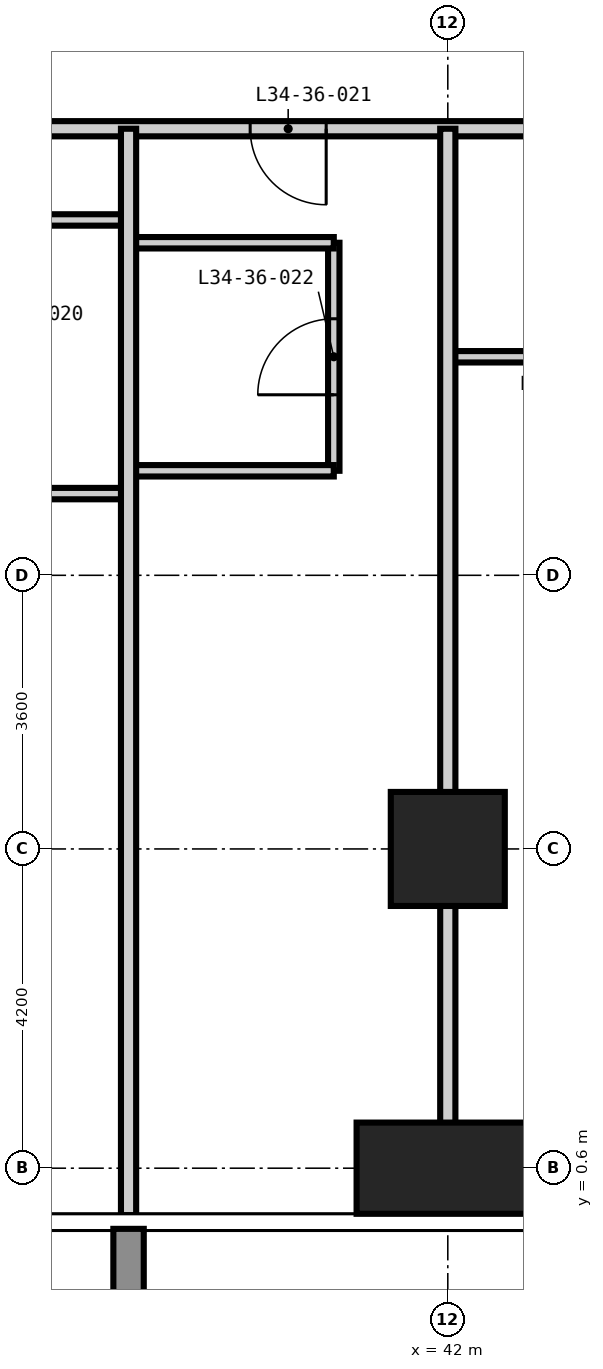
"""IFC4 building model, lengths in metres.
Left out: names, types, materials, properties, quantities, classifications, styles, units other than length and angle.
Written with IfcOpenShell. Run it as: python <this file> out.ifc"""

import sys

from ifc_helpers import new_model, si_unit, direction, frame, frame_2d, origin, origin_2d, place, context, subcontext, project, spatial, rectangle, extrude, element, fill, save


model = new_model("IFC4")
c1 = context("Model", 3, precision=1e-05, world=origin(), true_north=direction((0.0, 1.0)))
c2 = subcontext(c1, "Body", "Model", "MODEL_VIEW")
j1 = project(units=[si_unit("LENGTHUNIT", "METRE"), si_unit("PLANEANGLEUNIT", "RADIAN")], contexts=[c1])
p1 = place(None, origin())
s1 = spatial("IfcSite", under=j1, at=p1, CompositionType="ELEMENT")
p2 = place(p1, origin())
s2 = spatial("IfcBuilding", under=s1, at=p2, CompositionType="ELEMENT")
p3 = place(p2, frame((0.0, 0.0, 133.2)))
s3 = spatial("IfcBuildingStorey", under=s2, at=p3, CompositionType="ELEMENT", Elevation=133.2)
p4 = place(p3, frame((42.0, 0.6, -0.35), z_axis=(0.0, 0.0, 1.0), x_axis=(1.0, 0.0, 0.0)))
e1 = element("IfcColumn", 1, at=p4, inside=s3, PredefinedType="COLUMN", context=c2, shape_type="SweptSolid", body=[
    extrude(rectangle(XDim=2.4, YDim=1.2, at=origin_2d()), origin(), (0.0, 0.0, 1.0), 3.6),
])
p5 = place(p3, frame((42.0, 4.8, -0.35), z_axis=(0.0, 0.0, 1.0), x_axis=(1.0, 0.0, 0.0)))
e2 = element("IfcColumn", 2, at=p5, inside=s3, PredefinedType="COLUMN", context=c2, shape_type="SweptSolid", body=[
    extrude(rectangle(XDim=1.5, YDim=1.5, at=origin_2d()), origin(), (0.0, 0.0, 1.0), 3.6),
])
p6 = place(p3, frame((40.5, 9.775, 0.0), z_axis=(0.0, 0.0, 1.0), x_axis=(0.0, 1.0, 0.0)))
e3 = element("IfcWall", 3, at=p6, inside=s3, PredefinedType="PARTITIONING", context=c2, shape_type="SweptSolid", body=[
    extrude(rectangle(XDim=3.0, YDim=0.15, at=frame_2d((1.5, 0.0))), origin(), (0.0, 0.0, 1.0), 3.25),
])
p7 = place(p6, frame((1.0, 0.0, 0.0)))
e4 = element("IfcOpeningElement", 4, at=p7, cuts=e3, PredefinedType="OPENING", context=c2, shape_type="SweptSolid", body=[
    extrude(rectangle(XDim=1.0, YDim=2.1, at=frame_2d((0.5, 1.05))), frame((0.0, 0.085, 0.0), z_axis=(0.0, -1.0, 0.0), x_axis=(1.0, 0.0, 0.0)), (0.0, 0.0, 1.0), 0.17),
])
for number, where, z_axis, x_axis in (
    (5, (35.1, 9.475, 0.0), (0.0, 0.0, 1.0), (1.0, 0.0, 0.0)),
    (6, (37.8, 9.775, 0.0), (0.0, 0.0, 1.0), (1.0, 0.0, 0.0)),
):
    element("IfcWall", number, at=place(p3, frame(where, z_axis=z_axis, x_axis=x_axis)), inside=s3, PredefinedType="PARTITIONING", context=c2, shape_type="SweptSolid", body=[
        extrude(rectangle(XDim=2.7, YDim=0.15, at=frame_2d((1.35, 0.0))), origin(), (0.0, 0.0, 1.0), 3.25),
    ])
p8 = place(p3, frame((42.0, 11.275, 0.0), z_axis=(0.0, 0.0, 1.0), x_axis=(1.0, 0.0, 0.0)))
e7 = element("IfcWall", 7, at=p8, inside=s3, PredefinedType="PARTITIONING", context=c2, shape_type="SweptSolid", body=[
    extrude(rectangle(XDim=3.725, YDim=0.15, at=frame_2d((1.863, 0.0))), origin(), (0.0, 0.0, 1.0), 3.25),
])
p9 = place(p8, frame((1.438, 0.0, 0.0)))
e8 = element("IfcOpeningElement", 8, at=p9, cuts=e7, PredefinedType="OPENING", context=c2, shape_type="SweptSolid", body=[
    extrude(rectangle(XDim=0.85, YDim=2.1, at=frame_2d((0.425, 1.05))), frame((0.0, 0.085, 0.0), z_axis=(0.0, -1.0, 0.0), x_axis=(1.0, 0.0, 0.0)), (0.0, 0.0, 1.0), 0.17),
])
for number, where, z_axis, x_axis in (
    (9, (37.8, 12.775, 0.0), (0.0, 0.0, 1.0), (1.0, 0.0, 0.0)),
    (10, (35.1, 13.075, 0.0), (0.0, 0.0, 1.0), (1.0, 0.0, 0.0)),
):
    element("IfcWall", number, at=place(p3, frame(where, z_axis=z_axis, x_axis=x_axis)), inside=s3, PredefinedType="PARTITIONING", context=c2, shape_type="SweptSolid", body=[
        extrude(rectangle(XDim=2.7, YDim=0.15, at=frame_2d((1.35, 0.0))), origin(), (0.0, 0.0, 1.0), 3.25),
    ])
p10 = place(p3, frame((45.725, 14.275, 0.0), z_axis=(0.0, 0.0, 1.0), x_axis=(-1.0, 0.0, 0.0)))
e11 = element("IfcWall", 11, at=p10, inside=s3, PredefinedType="PARTITIONING", context=c2, shape_type="SweptSolid", body=[
    extrude(rectangle(XDim=33.125, YDim=0.2, at=frame_2d((16.562, 0.0))), origin(), (0.0, 0.0, 1.0), 3.25),
])
p11 = place(p10, frame((26.325, 0.0, 0.0)))
e12 = element("IfcOpeningElement", 12, at=p11, cuts=e11, PredefinedType="OPENING", context=c2, shape_type="SweptSolid", body=[
    extrude(rectangle(XDim=1.0, YDim=2.2, at=frame_2d((0.5, 1.1))), frame((0.0, 0.11, 0.0), z_axis=(0.0, -1.0, 0.0), x_axis=(1.0, 0.0, 0.0)), (0.0, 0.0, 1.0), 0.22),
])
p12 = place(p10, frame((21.225, 0.0, 0.0)))
e13 = element("IfcOpeningElement", 13, at=p12, cuts=e11, PredefinedType="OPENING", context=c2, shape_type="SweptSolid", body=[
    extrude(rectangle(XDim=1.0, YDim=2.2, at=frame_2d((0.5, 1.1))), frame((0.0, 0.11, 0.0), z_axis=(0.0, -1.0, 0.0), x_axis=(1.0, 0.0, 0.0)), (0.0, 0.0, 1.0), 0.22),
])
p13 = place(p10, frame((12.825, 0.0, 0.0)))
e14 = element("IfcOpeningElement", 14, at=p13, cuts=e11, PredefinedType="OPENING", context=c2, shape_type="SweptSolid", body=[
    extrude(rectangle(XDim=1.0, YDim=2.2, at=frame_2d((0.5, 1.1))), frame((0.0, 0.11, 0.0), z_axis=(0.0, -1.0, 0.0), x_axis=(1.0, 0.0, 0.0)), (0.0, 0.0, 1.0), 0.22),
])
p14 = place(p10, frame((5.325, 0.0, 0.0)))
e15 = element("IfcOpeningElement", 15, at=p14, cuts=e11, PredefinedType="OPENING", context=c2, shape_type="SweptSolid", body=[
    extrude(rectangle(XDim=1.0, YDim=2.2, at=frame_2d((0.5, 1.1))), frame((0.0, 0.11, 0.0), z_axis=(0.0, -1.0, 0.0), x_axis=(1.0, 0.0, 0.0)), (0.0, 0.0, 1.0), 0.22),
])
for number, where, z_axis, x_axis in (
    (16, (37.8, -0.018, 0.0), (0.0, 0.0, 1.0), (0.0, 1.0, 0.0)),
    (17, (42.0, -0.018, 0.0), (0.0, 0.0, 1.0), (0.0, 1.0, 0.0)),
):
    element("IfcWall", number, at=place(p3, frame(where, z_axis=z_axis, x_axis=x_axis)), inside=s3, PredefinedType="PARTITIONING", context=c2, shape_type="SweptSolid", body=[
        extrude(rectangle(XDim=14.293, YDim=0.2, at=frame_2d((7.146, 0.0))), origin(), (0.0, 0.0, 1.0), 3.25),
    ])
p15 = place(p14, origin())
e18 = element("IfcDoor", 18, at=p15, inside=s3, OperationType="SINGLE_SWING_LEFT", PredefinedType="DOOR", context=c2, shape_type="SweptSolid", body=[
    extrude(rectangle(XDim=1.0, YDim=2.2, at=frame_2d((0.5, 1.1))), frame((0.0, 0.025, 0.0), z_axis=(0.0, -1.0, 0.0), x_axis=(1.0, 0.0, 0.0)), (0.0, 0.0, 1.0), 0.05),
])
fill(e15, e18)
p16 = place(p7, origin())
e19 = element("IfcDoor", 19, at=p16, inside=s3, OperationType="SINGLE_SWING_LEFT", PredefinedType="DOOR", context=c2, shape_type="SweptSolid", body=[
    extrude(rectangle(XDim=1.0, YDim=2.1, at=frame_2d((0.5, 1.05))), frame((0.0, 0.025, 0.0), z_axis=(0.0, -1.0, 0.0), x_axis=(1.0, 0.0, 0.0)), (0.0, 0.0, 1.0), 0.05),
])
fill(e4, e19)
save(model, sys.argv[1])
